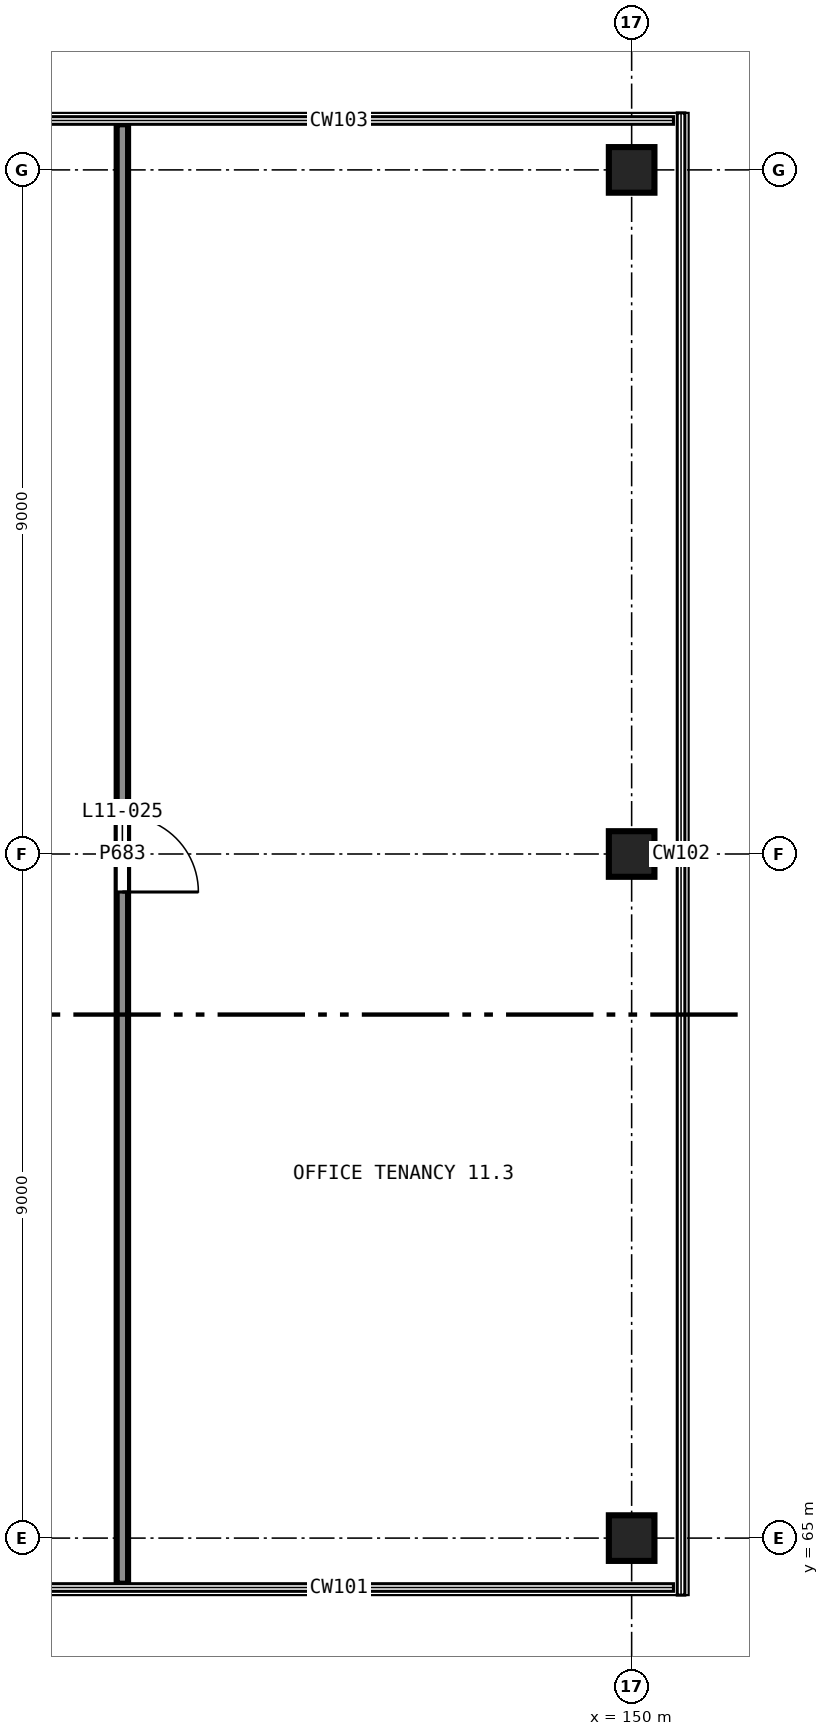
"""IFC4 building model, lengths in metres.
Left out: names, types, materials, properties, quantities, classifications, styles, units other than length and angle.
Written with IfcOpenShell. Run it as: python <this file> out.ifc"""

import sys

from ifc_helpers import new_model, si_unit, direction, frame, frame_2d, origin, origin_2d, place, context, subcontext, project, spatial, rectangle, extrude, element, fill, save


model = new_model("IFC4")
c1 = context("Model", 3, precision=1e-05, world=origin(), true_north=direction((0.0, 1.0)))
c2 = subcontext(c1, "Body", "Model", "MODEL_VIEW")
j1 = project(units=[si_unit("LENGTHUNIT", "METRE"), si_unit("PLANEANGLEUNIT", "RADIAN")], contexts=[c1])
p1 = place(None, origin())
s1 = spatial("IfcSite", under=j1, at=p1, CompositionType="ELEMENT")
p2 = place(p1, origin())
s2 = spatial("IfcBuilding", under=s1, at=p2, CompositionType="ELEMENT")
p3 = place(p2, frame((0.0, 0.0, 45.5)))
s3 = spatial("IfcBuildingStorey", under=s2, at=p3, CompositionType="ELEMENT", Elevation=45.5)
for number, where, z_axis, x_axis in (
    (1, (150.0, 65.0, 0.0), (0.0, 0.0, 1.0), (1.0, 0.0, 0.0)),
    (2, (150.0, 74.0, 0.0), (0.0, 0.0, 1.0), (1.0, 0.0, 0.0)),
    (3, (150.0, 83.0, 0.0), (0.0, 0.0, 1.0), (1.0, 0.0, 0.0)),
):
    element("IfcColumn", number, at=place(p3, frame(where, z_axis=z_axis, x_axis=x_axis)), inside=s3, PredefinedType="COLUMN", context=c2, shape_type="SweptSolid", body=[
        extrude(rectangle(XDim=0.6, YDim=0.6, at=origin_2d()), origin(), (0.0, 0.0, 1.0), 4.0),
    ])
p4 = place(p3, frame((143.3, 83.6, 0.0), z_axis=(0.0, 0.0, 1.0), x_axis=(0.0, -1.0, 0.0)))
e4 = element("IfcWall", 4, at=p4, inside=s3, PredefinedType="PARTITIONING", context=c2, shape_type="SweptSolid", body=[
    extrude(rectangle(XDim=19.2, YDim=0.15, at=frame_2d((9.6, 0.0))), origin(), (0.0, 0.0, 1.0), 3.75),
])
p5 = place(p4, frame((9.1, 0.0, 0.0)))
e5 = element("IfcOpeningElement", 5, at=p5, cuts=e4, PredefinedType="OPENING", context=c2, shape_type="SweptSolid", body=[
    extrude(rectangle(XDim=1.0, YDim=2.1, at=frame_2d((0.5, 1.05))), frame((0.0, 0.085, 0.0), z_axis=(0.0, -1.0, 0.0), x_axis=(1.0, 0.0, 0.0)), (0.0, 0.0, 1.0), 0.17),
])
p6 = place(p5, origin())
e6 = element("IfcDoor", 6, at=p6, inside=s3, OperationType="SINGLE_SWING_LEFT", PredefinedType="DOOR", context=c2, shape_type="SweptSolid", body=[
    extrude(rectangle(XDim=1.0, YDim=2.1, at=frame_2d((0.5, 1.05))), frame((0.0, 0.025, 0.0), z_axis=(0.0, -1.0, 0.0), x_axis=(1.0, 0.0, 0.0)), (0.0, 0.0, 1.0), 0.05),
])
fill(e5, e6)
save(model, sys.argv[1])
